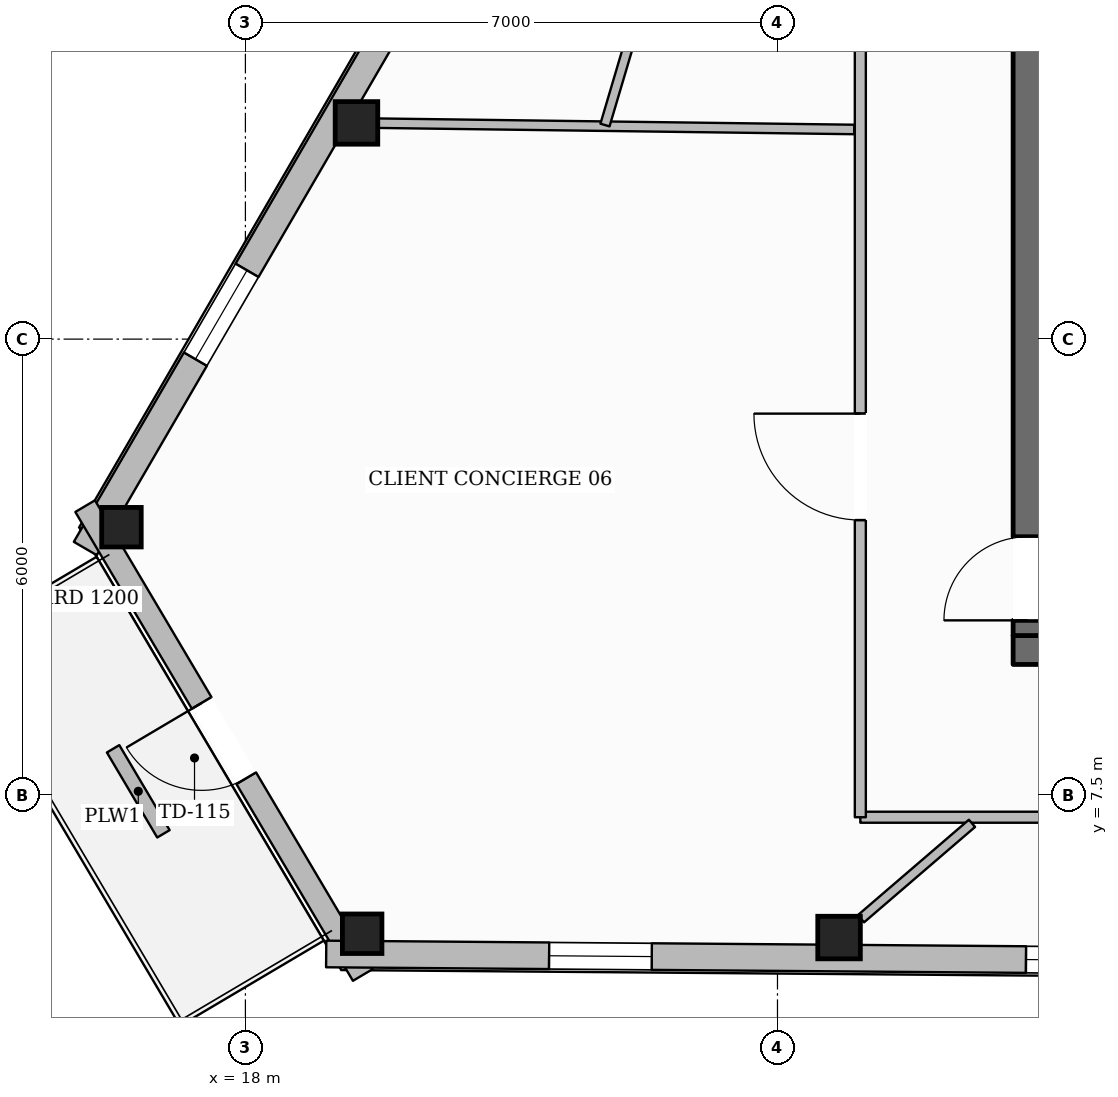
"""IFC4 building model, lengths in metres.
Left out: names, types, materials, properties, quantities, classifications, styles, units other than length and angle.
Written with IfcOpenShell. Run it as: python <this file> out.ifc"""

import sys

from ifc_helpers import new_model, si_unit, direction, frame, frame_2d, origin, origin_2d, place, context, subcontext, project, spatial, rectangle, hollow_rectangle, extrude, element, fill, save


model = new_model("IFC4")
c1 = context("Model", 3, precision=1e-05, world=origin(), true_north=direction((0.0, 1.0)))
c2 = subcontext(c1, "Body", "Model", "MODEL_VIEW")
j1 = project(units=[si_unit("LENGTHUNIT", "METRE"), si_unit("PLANEANGLEUNIT", "RADIAN")], contexts=[c1])
p1 = place(None, origin())
s1 = spatial("IfcSite", under=j1, at=p1, CompositionType="ELEMENT")
p2 = place(p1, origin())
s2 = spatial("IfcBuilding", under=s1, at=p2, CompositionType="ELEMENT")
p3 = place(p2, frame((0.0, 0.0, 266.45)))
s3 = spatial("IfcBuildingStorey", under=s2, at=p3, CompositionType="ELEMENT", Elevation=266.45)
p4 = place(p3, frame((28.1, 9.41, 0.0), z_axis=(0.0, 0.0, 1.0), x_axis=(1.0, 0.0, 0.0)))
e1 = element("IfcWall", 1, at=p4, inside=s3, PredefinedType="SOLIDWALL", context=c2, shape_type="SweptSolid", body=[
    extrude(rectangle(XDim=19.8, YDim=0.38, at=frame_2d((9.9, 0.0))), origin(), (0.0, 0.0, 1.0), 3.61),
])
p5 = place(p4, frame((10.4, 0.0, 0.0)))
e2 = element("IfcOpeningElement", 2, at=p5, cuts=e1, PredefinedType="OPENING", context=c2, shape_type="SweptSolid", body=[
    extrude(rectangle(XDim=1.4, YDim=2.2, at=frame_2d((0.7, 1.1))), frame((0.0, 0.2, 0.0), z_axis=(0.0, -1.0, 0.0), x_axis=(1.0, 0.0, 0.0)), (0.0, 0.0, 1.0), 0.4),
])
p6 = place(p3, frame((28.29, 9.6, 0.0), z_axis=(0.0, 0.0, 1.0), x_axis=(0.0, 1.0, 0.0)))
e3 = element("IfcWall", 3, at=p6, inside=s3, PredefinedType="SOLIDWALL", context=c2, shape_type="SweptSolid", body=[
    extrude(rectangle(XDim=13.0, YDim=0.38, at=frame_2d((6.5, 0.0))), origin(), (0.0, 0.0, 1.0), 3.61),
])
p7 = place(p6, frame((0.2, 0.0, 0.0)))
e4 = element("IfcOpeningElement", 4, at=p7, cuts=e3, PredefinedType="OPENING", context=c2, shape_type="SweptSolid", body=[
    extrude(rectangle(XDim=1.1, YDim=2.15, at=frame_2d((0.55, 1.075))), frame((0.0, 0.2, 0.0), z_axis=(0.0, -1.0, 0.0), x_axis=(1.0, 0.0, 0.0)), (0.0, 0.0, 1.0), 0.4),
])
p8 = place(p6, frame((8.4, 0.0, 0.0)))
e5 = element("IfcOpeningElement", 5, at=p8, cuts=e3, PredefinedType="OPENING", context=c2, shape_type="SweptSolid", body=[
    extrude(rectangle(XDim=0.9, YDim=2.1, at=frame_2d((0.45, 1.05))), frame((0.0, 0.2, 0.0), z_axis=(0.0, -1.0, 0.0), x_axis=(1.0, 0.0, 0.0)), (0.0, 0.0, 1.0), 0.4),
])
p9 = place(p3, frame((19.461, 16.344, 0.0), z_axis=(0.0, 0.0, 1.0), x_axis=(1.0, 0.0, 0.0)))
e6 = element("IfcColumn", 6, at=p9, inside=s3, PredefinedType="COLUMN", context=c2, shape_type="SweptSolid", body=[
    extrude(hollow_rectangle(XDim=0.56, YDim=0.56, WallThickness=0.025, at=origin_2d()), origin(), (0.0, 0.0, 1.0), 3.61),
])
for number, where, z_axis, x_axis in (
    (7, (16.369, 11.026, 0.0), (0.0, 0.0, 1.0), (1.0, 0.0, 0.0)),
    (8, (19.536, 5.677, 0.0), (0.0, 0.0, 1.0), (1.0, 0.0, 0.0)),
):
    element("IfcColumn", number, at=place(p3, frame(where, z_axis=z_axis, x_axis=x_axis)), inside=s3, PredefinedType="COLUMN", context=c2, shape_type="SweptSolid", body=[
        extrude(hollow_rectangle(XDim=0.52, YDim=0.52, WallThickness=0.024, at=origin_2d()), origin(), (0.0, 0.0, 1.0), 3.61),
    ])
p10 = place(p3, frame((25.81, 5.627, 0.0), z_axis=(0.0, 0.0, 1.0), x_axis=(1.0, 0.0, 0.0)))
e9 = element("IfcColumn", 9, at=p10, inside=s3, PredefinedType="COLUMN", context=c2, shape_type="SweptSolid", body=[
    extrude(hollow_rectangle(XDim=0.56, YDim=0.56, WallThickness=0.025, at=origin_2d()), origin(), (0.0, 0.0, 1.0), 3.61),
])
p11 = place(p3, frame((15.894, 10.745, 0.0), z_axis=(0.0, 0.0, 1.0), x_axis=(0.502581466224, 0.864529854781, 0.0)))
e10 = element("IfcWall", 10, at=p11, inside=s3, PredefinedType="STANDARD", context=c2, shape_type="SweptSolid", body=[
    extrude(rectangle(XDim=37.873, YDim=0.35, at=frame_2d((18.937, 0.0))), origin(), (0.0, 0.0, 1.0), 3.196),
])
p12 = place(p11, frame((33.643, 0.0, 0.65)))
e11 = element("IfcOpeningElement", 11, at=p12, cuts=e10, PredefinedType="OPENING", context=c2, shape_type="SweptSolid", body=[
    extrude(rectangle(XDim=1.35, YDim=1.75, at=frame_2d((0.675, 0.875))), frame((0.0, 0.185, 0.0), z_axis=(0.0, -1.0, 0.0), x_axis=(1.0, 0.0, 0.0)), (0.0, 0.0, 1.0), 0.37),
])
p13 = place(p11, frame((27.491, 0.0, 0.65)))
e12 = element("IfcOpeningElement", 12, at=p13, cuts=e10, PredefinedType="OPENING", context=c2, shape_type="SweptSolid", body=[
    extrude(rectangle(XDim=1.35, YDim=1.75, at=frame_2d((0.675, 0.875))), frame((0.0, 0.185, 0.0), z_axis=(0.0, -1.0, 0.0), x_axis=(1.0, 0.0, 0.0)), (0.0, 0.0, 1.0), 0.37),
])
p14 = place(p11, frame((15.187, 0.0, 0.65)))
e13 = element("IfcOpeningElement", 13, at=p14, cuts=e10, PredefinedType="OPENING", context=c2, shape_type="SweptSolid", body=[
    extrude(rectangle(XDim=1.35, YDim=1.75, at=frame_2d((0.675, 0.875))), frame((0.0, 0.185, 0.0), z_axis=(0.0, -1.0, 0.0), x_axis=(1.0, 0.0, 0.0)), (0.0, 0.0, 1.0), 0.37),
])
p15 = place(p11, frame((9.035, 0.0, 0.65)))
e14 = element("IfcOpeningElement", 14, at=p15, cuts=e10, PredefinedType="OPENING", context=c2, shape_type="SweptSolid", body=[
    extrude(rectangle(XDim=1.35, YDim=1.75, at=frame_2d((0.675, 0.875))), frame((0.0, 0.185, 0.0), z_axis=(0.0, -1.0, 0.0), x_axis=(1.0, 0.0, 0.0)), (0.0, 0.0, 1.0), 0.37),
])
p16 = place(p11, frame((2.883, 0.0, 0.65)))
e15 = element("IfcOpeningElement", 15, at=p16, cuts=e10, PredefinedType="OPENING", context=c2, shape_type="SweptSolid", body=[
    extrude(rectangle(XDim=1.35, YDim=1.75, at=frame_2d((0.675, 0.875))), frame((0.0, 0.185, 0.0), z_axis=(0.0, -1.0, 0.0), x_axis=(1.0, 0.0, 0.0)), (0.0, 0.0, 1.0), 0.37),
])
p17 = place(p3, frame((19.544, 5.134, 0.0), z_axis=(0.0, 0.0, 1.0), x_axis=(-0.509478402486, 0.860483444001, 0.0)))
e16 = element("IfcWall", 16, at=p17, inside=s3, PredefinedType="STANDARD", context=c2, shape_type="SweptSolid", body=[
    extrude(rectangle(XDim=7.168, YDim=0.3, at=frame_2d((3.584, 0.0))), origin(), (0.0, 0.0, 1.0), 3.196),
])
p18 = place(p17, frame((3.009, 0.0, 0.0)))
e17 = element("IfcOpeningElement", 17, at=p18, cuts=e16, PredefinedType="OPENING", context=c2, shape_type="SweptSolid", body=[
    extrude(rectangle(XDim=1.15, YDim=2.2, at=frame_2d((0.575, 1.1))), frame((0.0, 0.16, 0.0), z_axis=(0.0, -1.0, 0.0), x_axis=(1.0, 0.0, 0.0)), (0.0, 0.0, 1.0), 0.32),
])
p19 = place(p3, frame((57.657, 5.103, 0.0), z_axis=(0.0, 0.0, 1.0), x_axis=(-0.999968086085, 0.007989168371, 0.0)))
e18 = element("IfcWall", 18, at=p19, inside=s3, PredefinedType="STANDARD", context=c2, shape_type="SweptSolid", body=[
    extrude(rectangle(XDim=38.596, YDim=0.35, at=frame_2d((19.298, 0.0))), origin(), (0.0, 0.0, 1.0), 3.196),
])
p20 = place(p19, frame((34.313, 0.0, 0.65)))
e19 = element("IfcOpeningElement", 19, at=p20, cuts=e18, PredefinedType="OPENING", context=c2, shape_type="SweptSolid", body=[
    extrude(rectangle(XDim=1.35, YDim=1.75, at=frame_2d((0.675, 0.875))), frame((0.0, 0.185, 0.0), z_axis=(0.0, -1.0, 0.0), x_axis=(1.0, 0.0, 0.0)), (0.0, 0.0, 1.0), 0.37),
])
p21 = place(p19, frame((28.038, 0.0, 0.65)))
e20 = element("IfcOpeningElement", 20, at=p21, cuts=e18, PredefinedType="OPENING", context=c2, shape_type="SweptSolid", body=[
    extrude(rectangle(XDim=1.35, YDim=1.75, at=frame_2d((0.675, 0.875))), frame((0.0, 0.185, 0.0), z_axis=(0.0, -1.0, 0.0), x_axis=(1.0, 0.0, 0.0)), (0.0, 0.0, 1.0), 0.37),
])
p22 = place(p19, frame((15.49, 0.0, 0.65)))
e21 = element("IfcOpeningElement", 21, at=p22, cuts=e18, PredefinedType="OPENING", context=c2, shape_type="SweptSolid", body=[
    extrude(rectangle(XDim=1.35, YDim=1.75, at=frame_2d((0.675, 0.875))), frame((0.0, 0.185, 0.0), z_axis=(0.0, -1.0, 0.0), x_axis=(1.0, 0.0, 0.0)), (0.0, 0.0, 1.0), 0.37),
])
p23 = place(p19, frame((9.215, 0.0, 0.65)))
e22 = element("IfcOpeningElement", 22, at=p23, cuts=e18, PredefinedType="OPENING", context=c2, shape_type="SweptSolid", body=[
    extrude(rectangle(XDim=1.35, YDim=1.75, at=frame_2d((0.675, 0.875))), frame((0.0, 0.185, 0.0), z_axis=(0.0, -1.0, 0.0), x_axis=(1.0, 0.0, 0.0)), (0.0, 0.0, 1.0), 0.37),
])
p24 = place(p19, frame((2.941, 0.0, 0.65)))
e23 = element("IfcOpeningElement", 23, at=p24, cuts=e18, PredefinedType="OPENING", context=c2, shape_type="SweptSolid", body=[
    extrude(rectangle(XDim=1.35, YDim=1.75, at=frame_2d((0.675, 0.875))), frame((0.0, 0.185, 0.0), z_axis=(0.0, -1.0, 0.0), x_axis=(1.0, 0.0, 0.0)), (0.0, 0.0, 1.0), 0.37),
])
p25 = place(p3, frame((16.259, 8.11, 0.0), z_axis=(0.0, 0.0, 1.0), x_axis=(0.509488347534, -0.860477555621, 0.0)))
e24 = element("IfcWall", 24, at=p25, inside=s3, PredefinedType="USERDEFINED", context=c2, shape_type="SweptSolid", body=[
    extrude(rectangle(XDim=1.3, YDim=0.19, at=frame_2d((0.65, 0.0))), origin(), (0.0, 0.0, 1.0), 0.52),
])
p26 = place(p3, frame((49.91, 7.21, 0.0), z_axis=(0.0, 0.0, 1.0), x_axis=(-1.0, 0.0, 0.0)))
e25 = element("IfcWall", 25, at=p26, inside=s3, PredefinedType="PARTITIONING", context=c2, shape_type="SweptSolid", body=[
    extrude(rectangle(XDim=23.82, YDim=0.145, at=frame_2d((11.91, 0.0))), origin(), (0.0, 0.0, 1.0), 3.61),
])
p27 = place(p26, frame((13.81, 0.0, 0.0)))
e26 = element("IfcOpeningElement", 26, at=p27, cuts=e25, PredefinedType="OPENING", context=c2, shape_type="SweptSolid", body=[
    extrude(rectangle(XDim=0.98, YDim=2.15, at=frame_2d((0.49, 1.075))), frame((0.0, 0.083, 0.0), z_axis=(0.0, -1.0, 0.0), x_axis=(1.0, 0.0, 0.0)), (0.0, 0.0, 1.0), 0.165),
])
p28 = place(p26, frame((2.337, 0.0, 0.0)))
e27 = element("IfcOpeningElement", 27, at=p28, cuts=e25, PredefinedType="OPENING", context=c2, shape_type="SweptSolid", body=[
    extrude(rectangle(XDim=1.4, YDim=2.2, at=frame_2d((0.7, 1.1))), frame((0.0, 0.083, 0.0), z_axis=(0.0, -1.0, 0.0), x_axis=(1.0, 0.0, 0.0)), (0.0, 0.0, 1.0), 0.165),
])
p29 = place(p3, frame((26.09, 7.21, 0.0), z_axis=(0.0, 0.0, 1.0), x_axis=(0.0, 1.0, 0.0)))
e28 = element("IfcWall", 28, at=p29, inside=s3, PredefinedType="PARTITIONING", context=c2, shape_type="SweptSolid", body=[
    extrude(rectangle(XDim=17.78, YDim=0.145, at=frame_2d((8.89, 0.0))), origin(), (0.0, 0.0, 1.0), 3.349),
])
p30 = place(p29, frame((12.838, 0.0, 0.0)))
e29 = element("IfcOpeningElement", 29, at=p30, cuts=e28, PredefinedType="OPENING", context=c2, shape_type="SweptSolid", body=[
    extrude(rectangle(XDim=0.98, YDim=2.15, at=frame_2d((0.49, 1.075))), frame((0.0, 0.083, 0.0), z_axis=(0.0, -1.0, 0.0), x_axis=(1.0, 0.0, 0.0)), (0.0, 0.0, 1.0), 0.165),
])
p31 = place(p29, frame((3.91, 0.0, 0.0)))
e30 = element("IfcOpeningElement", 30, at=p31, cuts=e28, PredefinedType="OPENING", context=c2, shape_type="SweptSolid", body=[
    extrude(rectangle(XDim=1.4, YDim=2.2, at=frame_2d((0.7, 1.1))), frame((0.0, 0.083, 0.0), z_axis=(0.0, -1.0, 0.0), x_axis=(1.0, 0.0, 0.0)), (0.0, 0.0, 1.0), 0.165),
])
p32 = place(p3, frame((26.01, 16.258, 0.0), z_axis=(0.0, 0.0, 1.0), x_axis=(-0.99991313536, 0.013180354097, 0.0)))
e31 = element("IfcWall", 31, at=p32, inside=s3, PredefinedType="PARTITIONING", context=c2, shape_type="SweptSolid", body=[
    extrude(rectangle(XDim=6.261, YDim=0.125, at=frame_2d((3.13, 0.0))), origin(), (0.0, 0.0, 1.0), 3.246),
])
p33 = place(p3, frame((27.559, 7.129, 0.0), z_axis=(0.0, 0.0, 1.0), x_axis=(-0.758522289578, -0.65164709484, 0.0)))
e32 = element("IfcWall", 32, at=p33, inside=s3, PredefinedType="PARTITIONING", context=c2, shape_type="SweptSolid", body=[
    extrude(rectangle(XDim=1.926, YDim=0.125, at=frame_2d((0.963, 0.0))), origin(), (0.0, 0.0, 1.0), 3.61),
])
p34 = place(p3, frame((25.806, 26.694, 0.0), z_axis=(0.0, 0.0, 1.0), x_axis=(-0.28412826647, -0.958786278684, 0.0)))
e33 = element("IfcWall", 33, at=p34, inside=s3, PredefinedType="PARTITIONING", context=c2, shape_type="SweptSolid", body=[
    extrude(rectangle(XDim=10.823, YDim=0.125, at=frame_2d((5.412, 0.0))), origin(), (0.0, 0.0, 1.0), 3.349),
])
p35 = place(p34, frame((4.814, 0.0, 0.0)))
e34 = element("IfcOpeningElement", 34, at=p35, cuts=e33, PredefinedType="OPENING", context=c2, shape_type="SweptSolid", body=[
    extrude(rectangle(XDim=0.98, YDim=2.15, at=frame_2d((0.49, 1.075))), frame((0.0, 0.073, 0.0), z_axis=(0.0, -1.0, 0.0), x_axis=(1.0, 0.0, 0.0)), (0.0, 0.0, 1.0), 0.145),
])
p36 = place(p18, origin())
e35 = element("IfcDoor", 35, at=p36, inside=s3, OperationType="SINGLE_SWING_RIGHT", PredefinedType="DOOR", context=c2, shape_type="SweptSolid", body=[
    extrude(rectangle(XDim=1.15, YDim=2.2, at=frame_2d((0.575, 1.1))), frame((0.0, 0.025, 0.0), z_axis=(0.0, -1.0, 0.0), x_axis=(1.0, 0.0, 0.0)), (0.0, 0.0, 1.0), 0.05),
])
fill(e17, e35)
p37 = place(p16, origin())
e36 = element("IfcWindow", 36, at=p37, inside=s3, PartitioningType="SINGLE_PANEL", PredefinedType="WINDOW", context=c2, shape_type="SweptSolid", body=[
    extrude(rectangle(XDim=1.35, YDim=1.75, at=frame_2d((0.675, 0.875))), frame((0.0, 0.03, 0.0), z_axis=(0.0, -1.0, 0.0), x_axis=(1.0, 0.0, 0.0)), (0.0, 0.0, 1.0), 0.06),
])
fill(e15, e36)
p38 = place(p20, origin())
e37 = element("IfcWindow", 37, at=p38, inside=s3, PartitioningType="SINGLE_PANEL", PredefinedType="WINDOW", context=c2, shape_type="SweptSolid", body=[
    extrude(rectangle(XDim=1.35, YDim=1.75, at=frame_2d((0.675, 0.875))), frame((0.0, 0.03, 0.0), z_axis=(0.0, -1.0, 0.0), x_axis=(1.0, 0.0, 0.0)), (0.0, 0.0, 1.0), 0.06),
])
fill(e19, e37)
p39 = place(p21, origin())
e38 = element("IfcWindow", 38, at=p39, inside=s3, PartitioningType="SINGLE_PANEL", PredefinedType="WINDOW", context=c2, shape_type="SweptSolid", body=[
    extrude(rectangle(XDim=1.35, YDim=1.75, at=frame_2d((0.675, 0.875))), frame((0.0, 0.03, 0.0), z_axis=(0.0, -1.0, 0.0), x_axis=(1.0, 0.0, 0.0)), (0.0, 0.0, 1.0), 0.06),
])
fill(e20, e38)
p40 = place(p7, origin())
e39 = element("IfcDoor", 39, at=p40, inside=s3, OperationType="SINGLE_SWING_LEFT", PredefinedType="DOOR", context=c2, shape_type="SweptSolid", body=[
    extrude(rectangle(XDim=1.1, YDim=2.15, at=frame_2d((0.55, 1.075))), frame((0.0, 0.025, 0.0), z_axis=(0.0, -1.0, 0.0), x_axis=(1.0, 0.0, 0.0)), (0.0, 0.0, 1.0), 0.05),
])
fill(e4, e39)
p41 = place(p31, origin())
e40 = element("IfcDoor", 40, at=p41, inside=s3, OperationType="SINGLE_SWING_RIGHT", PredefinedType="DOOR", context=c2, shape_type="SweptSolid", body=[
    extrude(rectangle(XDim=1.4, YDim=2.2, at=frame_2d((0.7, 1.1))), frame((0.0, 0.025, 0.0), z_axis=(0.0, -1.0, 0.0), x_axis=(1.0, 0.0, 0.0)), (0.0, 0.0, 1.0), 0.05),
])
fill(e30, e40)
save(model, sys.argv[1])
